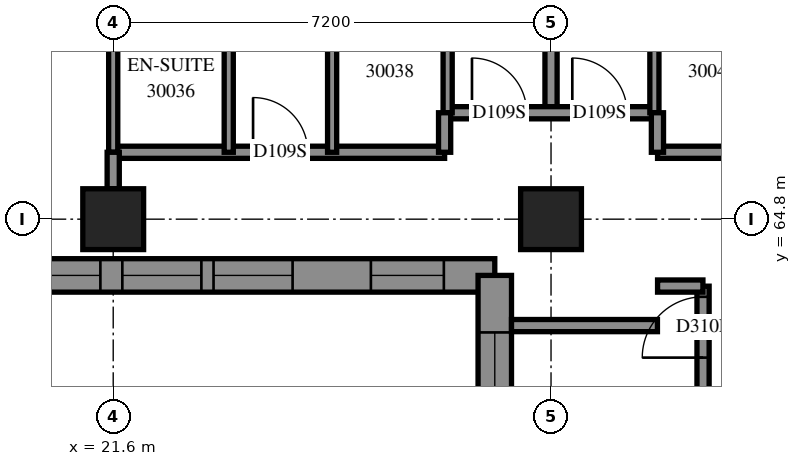
"""IFC4 building model, lengths in metres.
Left out: names, types, materials, properties, quantities, classifications, styles, units other than length and angle.
Written with IfcOpenShell. Run it as: python <this file> out.ifc"""

import sys

from ifc_helpers import new_model, si_unit, direction, frame, frame_2d, origin, origin_2d, place, context, subcontext, project, spatial, polyline, rectangle, outline, extrude, element, fill, save


model = new_model("IFC4")
c1 = context("Model", 3, precision=1e-05, world=origin(), true_north=direction((0.0, 1.0)))
c2 = subcontext(c1, "Body", "Model", "MODEL_VIEW")
j1 = project(units=[si_unit("LENGTHUNIT", "METRE"), si_unit("PLANEANGLEUNIT", "RADIAN")], contexts=[c1])
p1 = place(None, origin())
s1 = spatial("IfcSite", under=j1, at=p1, CompositionType="ELEMENT")
p2 = place(p1, origin())
s2 = spatial("IfcBuilding", under=s1, at=p2, CompositionType="ELEMENT")
p3 = place(p2, frame((0.0, 0.0, 111.8)))
s3 = spatial("IfcBuildingStorey", under=s2, at=p3, CompositionType="ELEMENT", Elevation=111.8)
for number, where, z_axis, x_axis in (
    (1, (21.6, 64.8, 0.0), (0.0, 0.0, 1.0), (1.0, 0.0, 0.0)),
    (2, (28.8, 64.8, 0.0), (0.0, 0.0, 1.0), (1.0, 0.0, 0.0)),
):
    element("IfcColumn", number, at=place(p3, frame(where, z_axis=z_axis, x_axis=x_axis)), inside=s3, PredefinedType="COLUMN", context=c2, shape_type="SweptSolid", body=[
        extrude(rectangle(XDim=1.0, YDim=1.0, at=origin_2d()), origin(), (0.0, 0.0, 1.0), 3.1),
    ])
p4 = place(p3, frame((19.503, 63.875, 0.0), z_axis=(0.0, 0.0, 1.0), x_axis=(1.0, 0.0, 0.0)))
e3 = element("IfcWall", 3, at=p4, inside=s3, PredefinedType="SOLIDWALL", context=c2, shape_type="SweptSolid", body=[
    extrude(outline(polyline([(-0.275, -0.275), (8.097, -0.275), (8.647, 0.275), (0.275, 0.275), (-0.275, -0.275)])), origin(), (0.0, 0.0, 1.0), 3.1),
])
p5 = place(p4, frame((2.247, 0.0, 0.5)))
e4 = element("IfcOpeningElement", 4, at=p5, cuts=e3, PredefinedType="OPENING", context=c2, shape_type="SweptSolid", body=[
    extrude(rectangle(XDim=1.3, YDim=2.45, at=frame_2d((0.65, 1.225))), frame((0.0, 0.285, 0.0), z_axis=(0.0, -1.0, 0.0), x_axis=(1.0, 0.0, 0.0)), (0.0, 0.0, 1.0), 0.57),
])
p6 = place(p4, frame((3.747, 0.0, 0.5)))
e5 = element("IfcOpeningElement", 5, at=p6, cuts=e3, PredefinedType="OPENING", context=c2, shape_type="SweptSolid", body=[
    extrude(rectangle(XDim=1.3, YDim=2.45, at=frame_2d((0.65, 1.225))), frame((0.0, 0.285, 0.0), z_axis=(0.0, -1.0, 0.0), x_axis=(1.0, 0.0, 0.0)), (0.0, 0.0, 1.0), 0.57),
])
p7 = place(p4, frame((0.686, 0.0, 0.5)))
e6 = element("IfcOpeningElement", 6, at=p7, cuts=e3, PredefinedType="OPENING", context=c2, shape_type="SweptSolid", body=[
    extrude(rectangle(XDim=1.2, YDim=2.45, at=frame_2d((0.6, 1.225))), frame((0.0, 0.285, 0.0), z_axis=(0.0, -1.0, 0.0), x_axis=(1.0, 0.0, 0.0)), (0.0, 0.0, 1.0), 0.57),
])
p8 = place(p4, frame((6.335, 0.0, 0.5)))
e7 = element("IfcOpeningElement", 7, at=p8, cuts=e3, PredefinedType="OPENING", context=c2, shape_type="SweptSolid", body=[
    extrude(rectangle(XDim=1.2, YDim=2.45, at=frame_2d((0.6, 1.225))), frame((0.0, 0.285, 0.0), z_axis=(0.0, -1.0, 0.0), x_axis=(1.0, 0.0, 0.0)), (0.0, 0.0, 1.0), 0.57),
])
p9 = place(p3, frame((27.875, 63.875, 0.0), z_axis=(0.0, 0.0, 1.0), x_axis=(0.0, -1.0, 0.0)))
e8 = element("IfcWall", 8, at=p9, inside=s3, PredefinedType="SOLIDWALL", context=c2, shape_type="SweptSolid", body=[
    extrude(outline(polyline([(0.275, -0.275), (8.647, -0.275), (8.097, 0.275), (-0.275, 0.275), (0.275, -0.275)])), origin(), (0.0, 0.0, 1.0), 3.1),
])
p10 = place(p9, frame((3.325, 0.0, 0.5)))
e9 = element("IfcOpeningElement", 9, at=p10, cuts=e8, PredefinedType="OPENING", context=c2, shape_type="SweptSolid", body=[
    extrude(rectangle(XDim=1.3, YDim=2.45, at=frame_2d((0.65, 1.225))), frame((0.0, 0.285, 0.0), z_axis=(0.0, -1.0, 0.0), x_axis=(1.0, 0.0, 0.0)), (0.0, 0.0, 1.0), 0.57),
])
p11 = place(p9, frame((0.938, 0.0, 0.5)))
e10 = element("IfcOpeningElement", 10, at=p11, cuts=e8, PredefinedType="OPENING", context=c2, shape_type="SweptSolid", body=[
    extrude(rectangle(XDim=1.2, YDim=2.45, at=frame_2d((0.6, 1.225))), frame((0.0, 0.285, 0.0), z_axis=(0.0, -1.0, 0.0), x_axis=(1.0, 0.0, 0.0)), (0.0, 0.0, 1.0), 0.57),
])
p12 = place(p9, frame((6.486, 0.0, 0.5)))
e11 = element("IfcOpeningElement", 11, at=p12, cuts=e8, PredefinedType="OPENING", context=c2, shape_type="SweptSolid", body=[
    extrude(rectangle(XDim=1.2, YDim=2.45, at=frame_2d((0.6, 1.225))), frame((0.0, 0.285, 0.0), z_axis=(0.0, -1.0, 0.0), x_axis=(1.0, 0.0, 0.0)), (0.0, 0.0, 1.0), 0.57),
])
p13 = place(p9, frame((5.155, 0.0, 0.5)))
e12 = element("IfcOpeningElement", 12, at=p13, cuts=e8, PredefinedType="OPENING", context=c2, shape_type="SweptSolid", body=[
    extrude(rectangle(XDim=1.2, YDim=2.45, at=frame_2d((0.6, 1.225))), frame((0.0, 0.285, 0.0), z_axis=(0.0, -1.0, 0.0), x_axis=(1.0, 0.0, 0.0)), (0.0, 0.0, 1.0), 0.57),
])
p14 = place(p3, frame((21.6, 65.9, 0.0), z_axis=(0.0, 0.0, 1.0), x_axis=(1.0, 0.0, 0.0)))
e13 = element("IfcWall", 13, at=p14, inside=s3, PredefinedType="PARTITIONING", context=c2, shape_type="SweptSolid", body=[
    extrude(rectangle(XDim=5.45, YDim=0.2, at=frame_2d((2.725, 0.0))), origin(), (0.0, 0.0, 1.0), 3.1),
])
p15 = place(p14, frame((2.3, 0.0, 0.0)))
e14 = element("IfcOpeningElement", 14, at=p15, cuts=e13, PredefinedType="OPENING", context=c2, shape_type="SweptSolid", body=[
    extrude(rectangle(XDim=0.9, YDim=2.1, at=frame_2d((0.45, 1.05))), frame((0.0, 0.11, 0.0), z_axis=(0.0, -1.0, 0.0), x_axis=(1.0, 0.0, 0.0)), (0.0, 0.0, 1.0), 0.22),
])
p16 = place(p3, frame((28.8, 66.55, 0.0), z_axis=(0.0, 0.0, 1.0), x_axis=(0.0, 1.0, 0.0)))
e15 = element("IfcWall", 15, at=p16, inside=s3, PredefinedType="PARTITIONING", context=c2, shape_type="SweptSolid", body=[
    extrude(rectangle(XDim=4.95, YDim=0.2, at=frame_2d((2.475, 0.0))), origin(), (0.0, 0.0, 1.0), 3.1),
])
p17 = place(p3, frame((27.1, 66.55, 0.0), z_axis=(0.0, 0.0, 1.0), x_axis=(1.0, 0.0, 0.0)))
e16 = element("IfcWall", 16, at=p17, inside=s3, PredefinedType="PARTITIONING", context=c2, shape_type="SweptSolid", body=[
    extrude(rectangle(XDim=3.4, YDim=0.2, at=frame_2d((1.7, 0.0))), origin(), (0.0, 0.0, 1.0), 3.1),
])
p18 = place(p17, frame((0.4, 0.0, 0.0)))
e17 = element("IfcOpeningElement", 17, at=p18, cuts=e16, PredefinedType="OPENING", context=c2, shape_type="SweptSolid", body=[
    extrude(rectangle(XDim=0.9, YDim=2.1, at=frame_2d((0.45, 1.05))), frame((0.0, 0.11, 0.0), z_axis=(0.0, -1.0, 0.0), x_axis=(1.0, 0.0, 0.0)), (0.0, 0.0, 1.0), 0.22),
])
p19 = place(p17, frame((2.05, 0.0, 0.0)))
e18 = element("IfcOpeningElement", 18, at=p19, cuts=e16, PredefinedType="OPENING", context=c2, shape_type="SweptSolid", body=[
    extrude(rectangle(XDim=0.9, YDim=2.1, at=frame_2d((0.45, 1.05))), frame((0.0, 0.11, 0.0), z_axis=(0.0, -1.0, 0.0), x_axis=(1.0, 0.0, 0.0)), (0.0, 0.0, 1.0), 0.22),
])
p20 = place(p3, frame((30.552, 65.9, 0.0), z_axis=(0.0, 0.0, 1.0), x_axis=(1.0, 0.0, 0.0)))
e19 = element("IfcWall", 19, at=p20, inside=s3, PredefinedType="PARTITIONING", context=c2, shape_type="SweptSolid", body=[
    extrude(rectangle(XDim=2.948, YDim=0.2, at=frame_2d((1.474, 0.0))), origin(), (0.0, 0.0, 1.0), 3.1),
])
p21 = place(p3, frame((31.3, 61.102, 0.0), z_axis=(0.0, 0.0, 1.0), x_axis=(0.0, 1.0, 0.0)))
e20 = element("IfcWall", 20, at=p21, inside=s3, PredefinedType="PARTITIONING", context=c2, shape_type="SweptSolid", body=[
    extrude(rectangle(XDim=2.596, YDim=0.2, at=frame_2d((1.298, 0.0))), origin(), (0.0, 0.0, 1.0), 3.1),
])
p22 = place(p21, frame((1.421, 0.0, 0.0)))
e21 = element("IfcOpeningElement", 21, at=p22, cuts=e20, PredefinedType="OPENING", context=c2, shape_type="SweptSolid", body=[
    extrude(rectangle(XDim=1.0, YDim=2.1, at=frame_2d((0.5, 1.05))), frame((0.0, 0.11, 0.0), z_axis=(0.0, -1.0, 0.0), x_axis=(1.0, 0.0, 0.0)), (0.0, 0.0, 1.0), 0.22),
])
p23 = place(p3, frame((21.6, 65.9, 0.0), z_axis=(0.0, 0.0, 1.0), x_axis=(0.0, 1.0, 0.0)))
e22 = element("IfcWall", 22, at=p23, inside=s3, PredefinedType="PARTITIONING", context=c2, shape_type="SweptSolid", body=[
    extrude(rectangle(XDim=2.4, YDim=0.15, at=frame_2d((1.2, 0.0))), origin(), (0.0, 0.0, 1.0), 2.6),
])
for number, where, z_axis, x_axis in (
    (23, (23.5, 65.9, 0.0), (0.0, 0.0, 1.0), (0.0, 1.0, 0.0)),
    (24, (25.2, 65.9, 0.0), (0.0, 0.0, 1.0), (0.0, 1.0, 0.0)),
):
    element("IfcWall", number, at=place(p3, frame(where, z_axis=z_axis, x_axis=x_axis)), inside=s3, PredefinedType="PARTITIONING", context=c2, shape_type="SweptSolid", body=[
        extrude(rectangle(XDim=2.4, YDim=0.15, at=frame_2d((1.2, 0.0))), origin(), (0.0, 0.0, 1.0), 3.1),
    ])
p24 = place(p3, frame((28.15, 63.05, 0.0), z_axis=(0.0, 0.0, 1.0), x_axis=(1.0, 0.0, 0.0)))
e25 = element("IfcWall", 25, at=p24, inside=s3, PredefinedType="PARTITIONING", context=c2, shape_type="SweptSolid", body=[
    extrude(rectangle(XDim=2.4, YDim=0.2, at=frame_2d((1.2, 0.0))), origin(), (0.0, 0.0, 1.0), 3.1),
])
for number, where, z_axis, x_axis in (
    (26, (27.1, 66.55, 0.0), (0.0, 0.0, 1.0), (0.0, 1.0, 0.0)),
    (27, (30.5, 66.55, 0.0), (0.0, 0.0, 1.0), (0.0, 1.0, 0.0)),
):
    element("IfcWall", number, at=place(p3, frame(where, z_axis=z_axis, x_axis=x_axis)), inside=s3, PredefinedType="PARTITIONING", context=c2, shape_type="SweptSolid", body=[
        extrude(rectangle(XDim=1.75, YDim=0.15, at=frame_2d((0.875, 0.0))), origin(), (0.0, 0.0, 1.0), 3.1),
    ])
p25 = place(p3, frame((30.552, 63.7, 0.0), z_axis=(0.0, 0.0, 1.0), x_axis=(1.0, 0.0, 0.0)))
e28 = element("IfcWall", 28, at=p25, inside=s3, PredefinedType="PARTITIONING", context=c2, shape_type="SweptSolid", body=[
    extrude(rectangle(XDim=0.746, YDim=0.2, at=frame_2d((0.373, 0.0))), origin(), (0.0, 0.0, 1.0), 3.1),
])
for number, where, z_axis, x_axis in (
    (29, (27.05, 65.9, 0.0), (0.0, 0.0, 1.0), (0.0, 1.0, 0.0)),
    (30, (30.55, 65.9, 0.0), (0.0, 0.0, 1.0), (0.0, 1.0, 0.0)),
):
    element("IfcWall", number, at=place(p3, frame(where, z_axis=z_axis, x_axis=x_axis)), inside=s3, PredefinedType="PARTITIONING", context=c2, shape_type="SweptSolid", body=[
        extrude(rectangle(XDim=0.65, YDim=0.2, at=frame_2d((0.325, 0.0))), origin(), (0.0, 0.0, 1.0), 3.1),
    ])
p26 = place(p3, frame((21.6, 65.3, 0.0), z_axis=(0.0, 0.0, 1.0), x_axis=(0.0, 1.0, 0.0)))
e31 = element("IfcWall", 31, at=p26, inside=s3, PredefinedType="PARTITIONING", context=c2, shape_type="SweptSolid", body=[
    extrude(rectangle(XDim=0.6, YDim=0.2, at=frame_2d((0.3, 0.0))), origin(), (0.0, 0.0, 1.0), 2.6),
])
p27 = place(p5, origin())
e32 = element("IfcWindow", 32, at=p27, inside=s3, PartitioningType="SINGLE_PANEL", PredefinedType="WINDOW", context=c2, shape_type="SweptSolid", body=[
    extrude(rectangle(XDim=1.3, YDim=2.45, at=frame_2d((0.65, 1.225))), frame((0.0, 0.155, 0.0), z_axis=(0.0, -1.0, 0.0), x_axis=(1.0, 0.0, 0.0)), (0.0, 0.0, 1.0), 0.06),
])
fill(e4, e32)
p28 = place(p6, origin())
e33 = element("IfcWindow", 33, at=p28, inside=s3, PartitioningType="SINGLE_PANEL", PredefinedType="WINDOW", context=c2, shape_type="SweptSolid", body=[
    extrude(rectangle(XDim=1.3, YDim=2.45, at=frame_2d((0.65, 1.225))), frame((0.0, 0.155, 0.0), z_axis=(0.0, -1.0, 0.0), x_axis=(1.0, 0.0, 0.0)), (0.0, 0.0, 1.0), 0.06),
])
fill(e5, e33)
p29 = place(p7, origin())
e34 = element("IfcWindow", 34, at=p29, inside=s3, PartitioningType="SINGLE_PANEL", PredefinedType="WINDOW", context=c2, shape_type="SweptSolid", body=[
    extrude(rectangle(XDim=1.2, YDim=2.45, at=frame_2d((0.6, 1.225))), frame((0.0, 0.155, 0.0), z_axis=(0.0, -1.0, 0.0), x_axis=(1.0, 0.0, 0.0)), (0.0, 0.0, 1.0), 0.06),
])
fill(e6, e34)
p30 = place(p8, origin())
e35 = element("IfcWindow", 35, at=p30, inside=s3, PartitioningType="SINGLE_PANEL", PredefinedType="WINDOW", context=c2, shape_type="SweptSolid", body=[
    extrude(rectangle(XDim=1.2, YDim=2.45, at=frame_2d((0.6, 1.225))), frame((0.0, 0.155, 0.0), z_axis=(0.0, -1.0, 0.0), x_axis=(1.0, 0.0, 0.0)), (0.0, 0.0, 1.0), 0.06),
])
fill(e7, e35)
p31 = place(p11, origin())
e36 = element("IfcWindow", 36, at=p31, inside=s3, PartitioningType="SINGLE_PANEL", PredefinedType="WINDOW", context=c2, shape_type="SweptSolid", body=[
    extrude(rectangle(XDim=1.2, YDim=2.45, at=frame_2d((0.6, 1.225))), frame((0.0, 0.155, 0.0), z_axis=(0.0, -1.0, 0.0), x_axis=(1.0, 0.0, 0.0)), (0.0, 0.0, 1.0), 0.06),
])
fill(e10, e36)
p32 = place(p22, origin())
e37 = element("IfcDoor", 37, at=p32, inside=s3, OperationType="SINGLE_SWING_LEFT", PredefinedType="DOOR", context=c2, shape_type="SweptSolid", body=[
    extrude(rectangle(XDim=1.0, YDim=2.1, at=frame_2d((0.5, 1.05))), frame((0.0, 0.025, 0.0), z_axis=(0.0, -1.0, 0.0), x_axis=(1.0, 0.0, 0.0)), (0.0, 0.0, 1.0), 0.05),
])
fill(e21, e37)
p33 = place(p15, origin())
e38 = element("IfcDoor", 38, at=p33, inside=s3, OperationType="SINGLE_SWING_RIGHT", PredefinedType="DOOR", context=c2, shape_type="SweptSolid", body=[
    extrude(rectangle(XDim=0.9, YDim=2.1, at=frame_2d((0.45, 1.05))), frame((0.0, 0.025, 0.0), z_axis=(0.0, -1.0, 0.0), x_axis=(1.0, 0.0, 0.0)), (0.0, 0.0, 1.0), 0.05),
])
fill(e14, e38)
p34 = place(p18, origin())
e39 = element("IfcDoor", 39, at=p34, inside=s3, OperationType="SINGLE_SWING_LEFT", PredefinedType="DOOR", context=c2, shape_type="SweptSolid", body=[
    extrude(rectangle(XDim=0.9, YDim=2.1, at=frame_2d((0.45, 1.05))), frame((0.0, 0.025, 0.0), z_axis=(0.0, -1.0, 0.0), x_axis=(1.0, 0.0, 0.0)), (0.0, 0.0, 1.0), 0.05),
])
fill(e17, e39)
p35 = place(p19, origin())
e40 = element("IfcDoor", 40, at=p35, inside=s3, OperationType="SINGLE_SWING_RIGHT", PredefinedType="DOOR", context=c2, shape_type="SweptSolid", body=[
    extrude(rectangle(XDim=0.9, YDim=2.1, at=frame_2d((0.45, 1.05))), frame((0.0, 0.025, 0.0), z_axis=(0.0, -1.0, 0.0), x_axis=(1.0, 0.0, 0.0)), (0.0, 0.0, 1.0), 0.05),
])
fill(e18, e40)
save(model, sys.argv[1])
